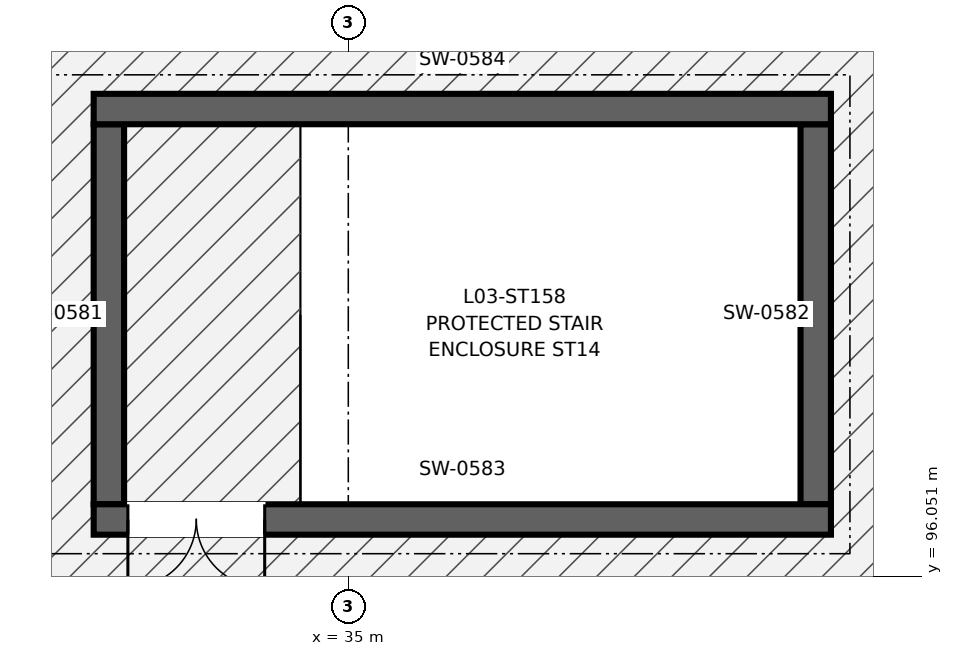
"""IFC4 building model, lengths in metres.
Left out: names, types, materials, properties, quantities, classifications, styles, units other than length and angle.
Written with IfcOpenShell. Run it as: python <this file> out.ifc"""

import sys

from ifc_helpers import new_model, si_unit, direction, frame, frame_2d, origin, place, context, subcontext, project, spatial, rectangle, extrude, element, fill, save


model = new_model("IFC4")
c1 = context("Model", 3, precision=1e-05, world=origin(), true_north=direction((0.0, 1.0)))
c2 = subcontext(c1, "Body", "Model", "MODEL_VIEW")
j1 = project(units=[si_unit("LENGTHUNIT", "METRE"), si_unit("PLANEANGLEUNIT", "RADIAN")], contexts=[c1])
p1 = place(None, origin())
s1 = spatial("IfcSite", under=j1, at=p1, CompositionType="ELEMENT")
p2 = place(p1, origin())
s2 = spatial("IfcBuilding", under=s1, at=p2, CompositionType="ELEMENT")
p3 = place(p2, frame((0.0, 0.0, 13.5)))
s3 = spatial("IfcBuildingStorey", under=s2, at=p3, CompositionType="ELEMENT", Elevation=13.5)
for number, where, z_axis, x_axis in (
    (1, (31.85, 97.0, 0.0), (0.0, 0.0, 1.0), (0.0, 1.0, 0.0)),
    (2, (41.15, 97.0, 0.0), (0.0, 0.0, 1.0), (0.0, 1.0, 0.0)),
):
    element("IfcWall", number, at=place(p3, frame(where, z_axis=z_axis, x_axis=x_axis)), inside=s3, PredefinedType="SHEAR", context=c2, shape_type="SweptSolid", body=[
        extrude(rectangle(XDim=5.0, YDim=0.4, at=frame_2d((2.5, 0.0))), origin(), (0.0, 0.0, 1.0), 4.305),
    ])
p4 = place(p3, frame((31.65, 96.8, 0.0), z_axis=(0.0, 0.0, 1.0), x_axis=(1.0, 0.0, 0.0)))
e3 = element("IfcWall", 3, at=p4, inside=s3, PredefinedType="SHEAR", context=c2, shape_type="SweptSolid", body=[
    extrude(rectangle(XDim=9.7, YDim=0.4, at=frame_2d((4.85, 0.0))), origin(), (0.0, 0.0, 1.0), 4.305),
])
p5 = place(p4, frame((0.45, 0.0, 0.0)))
e4 = element("IfcOpeningElement", 4, at=p5, cuts=e3, PredefinedType="OPENING", context=c2, shape_type="SweptSolid", body=[
    extrude(rectangle(XDim=1.8, YDim=2.35, at=frame_2d((0.9, 1.175))), frame((0.0, 0.21, 0.0), z_axis=(0.0, -1.0, 0.0), x_axis=(1.0, 0.0, 0.0)), (0.0, 0.0, 1.0), 0.42),
])
p6 = place(p3, frame((31.65, 102.2, 0.0), z_axis=(0.0, 0.0, 1.0), x_axis=(1.0, 0.0, 0.0)))
e5 = element("IfcWall", 5, at=p6, inside=s3, PredefinedType="SHEAR", context=c2, shape_type="SweptSolid", body=[
    extrude(rectangle(XDim=9.7, YDim=0.4, at=frame_2d((4.85, 0.0))), origin(), (0.0, 0.0, 1.0), 4.305),
])
p7 = place(p5, frame((1.8, 0.0, 0.0), z_axis=(0.0, 0.0, 1.0), x_axis=(-1.0, 0.0, 0.0)))
e6 = element("IfcDoor", 6, at=p7, inside=s3, OperationType="DOUBLE_DOOR_SINGLE_SWING", PredefinedType="DOOR", context=c2, shape_type="SweptSolid", body=[
    extrude(rectangle(XDim=1.8, YDim=2.35, at=frame_2d((0.9, 1.175))), frame((0.0, 0.025, 0.0), z_axis=(0.0, -1.0, 0.0), x_axis=(1.0, 0.0, 0.0)), (0.0, 0.0, 1.0), 0.05),
])
fill(e4, e6)
save(model, sys.argv[1])
